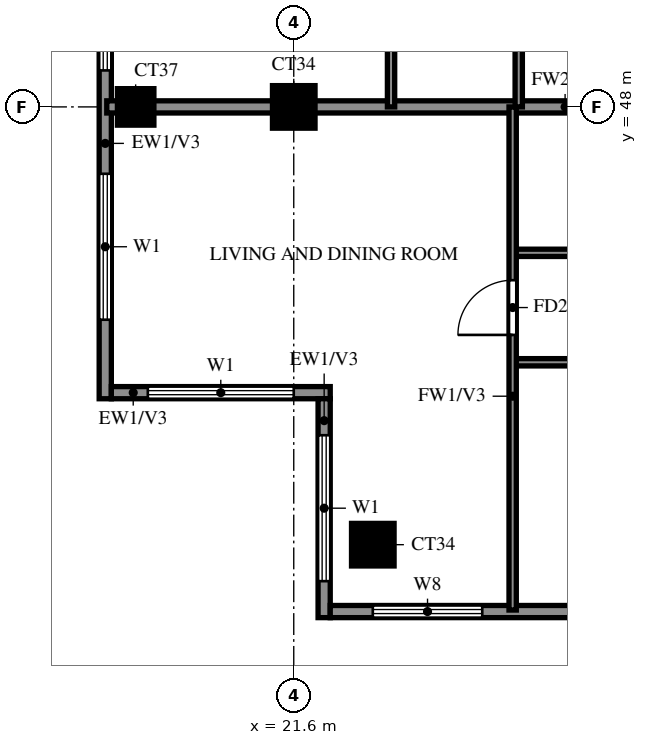
"""IFC4 building model, lengths in metres.
Left out: names, types, materials, properties, quantities, classifications, styles, units other than length and angle.
Written with IfcOpenShell. Run it as: python <this file> out.ifc"""

import sys

from ifc_helpers import new_model, si_unit, direction, frame, frame_2d, origin, origin_2d, place, context, subcontext, project, spatial, rectangle, extrude, source, transform, mapped, element, fill, save


model = new_model("IFC4")
c1 = context("Model", 3, precision=1e-05, world=origin(), true_north=direction((0.0, 1.0)))
c2 = subcontext(c1, "Body", "Model", "MODEL_VIEW")
j1 = project(units=[si_unit("LENGTHUNIT", "METRE"), si_unit("PLANEANGLEUNIT", "RADIAN")], contexts=[c1])
p1 = place(None, origin())
s1 = spatial("IfcSite", under=j1, at=p1, CompositionType="ELEMENT")
p2 = place(p1, origin())
s2 = spatial("IfcBuilding", under=s1, at=p2, CompositionType="ELEMENT")
p3 = place(p2, frame((0.0, 0.0, 260.5)))
s3 = spatial("IfcBuildingStorey", under=s2, at=p3, CompositionType="ELEMENT", Elevation=260.5)
m1 = source(origin(), c2, "Body", "SweptSolid", [
    extrude(rectangle(XDim=0.7, YDim=0.7, at=origin_2d()), origin(), (0.0, 0.0, 1.0), 3.22),
])
p4 = place(p3, frame((22.9, 40.8, 0.0), z_axis=(0.0, 0.0, 1.0), x_axis=(1.0, 0.0, 0.0)))
e1 = element("IfcColumn", 1, at=p4, inside=s3, PredefinedType="COLUMN", context=c2, shape_type="MappedRepresentation", body=[
    mapped(m1, transform((0.0, 0.0, 0.0))),
])
m2 = source(origin(), c2, "Body", "SweptSolid", [
    extrude(rectangle(XDim=0.6, YDim=0.6, at=origin_2d()), origin(), (0.0, 0.0, 1.0), 3.22),
])
p5 = place(p3, frame((19.0, 48.0, 0.0), z_axis=(0.0, 0.0, 1.0), x_axis=(1.0, 0.0, 0.0)))
e2 = element("IfcColumn", 2, at=p5, inside=s3, PredefinedType="COLUMN", context=c2, shape_type="MappedRepresentation", body=[
    mapped(m2, transform((0.0, 0.0, 0.0))),
])
p6 = place(p3, frame((21.6, 48.0, 0.0), z_axis=(0.0, 0.0, 1.0), x_axis=(1.0, 0.0, 0.0)))
e3 = element("IfcColumn", 3, at=p6, inside=s3, PredefinedType="COLUMN", context=c2, shape_type="MappedRepresentation", body=[
    mapped(m1, transform((0.0, 0.0, 0.0))),
])
p7 = place(p3, frame((18.5, 55.2, 0.0), z_axis=(0.0, 0.0, 1.0), x_axis=(0.0, -1.0, 0.0)))
e4 = element("IfcWall", 4, at=p7, inside=s3, PredefinedType="SOLIDWALL", context=c2, shape_type="SweptSolid", body=[
    extrude(rectangle(XDim=12.0, YDim=0.2, at=frame_2d((6.0, 0.0))), origin(), (0.0, 0.0, 1.0), 3.22),
])
p8 = place(p7, frame((8.3, 0.0, 0.6)))
e5 = element("IfcOpeningElement", 5, at=p8, cuts=e4, PredefinedType="OPENING", context=c2, shape_type="SweptSolid", body=[
    extrude(rectangle(XDim=2.4, YDim=2.4, at=frame_2d((1.2, 1.2))), frame((0.0, 0.11, 0.0), z_axis=(0.0, -1.0, 0.0), x_axis=(1.0, 0.0, 0.0)), (0.0, 0.0, 1.0), 0.22),
])
p9 = place(p7, frame((4.2, 0.0, 0.6)))
e6 = element("IfcOpeningElement", 6, at=p9, cuts=e4, PredefinedType="OPENING", context=c2, shape_type="SweptSolid", body=[
    extrude(rectangle(XDim=2.4, YDim=2.4, at=frame_2d((1.2, 1.2))), frame((0.0, 0.11, 0.0), z_axis=(0.0, -1.0, 0.0), x_axis=(1.0, 0.0, 0.0)), (0.0, 0.0, 1.0), 0.22),
])
p10 = place(p7, frame((0.7, 0.0, 0.6)))
e7 = element("IfcOpeningElement", 7, at=p10, cuts=e4, PredefinedType="OPENING", context=c2, shape_type="SweptSolid", body=[
    extrude(rectangle(XDim=2.4, YDim=2.4, at=frame_2d((1.2, 1.2))), frame((0.0, 0.11, 0.0), z_axis=(0.0, -1.0, 0.0), x_axis=(1.0, 0.0, 0.0)), (0.0, 0.0, 1.0), 0.22),
])
p11 = place(p3, frame((18.6, 43.3, 0.0), z_axis=(0.0, 0.0, 1.0), x_axis=(1.0, 0.0, 0.0)))
e8 = element("IfcWall", 8, at=p11, inside=s3, PredefinedType="SOLIDWALL", context=c2, shape_type="SweptSolid", body=[
    extrude(rectangle(XDim=3.6, YDim=0.2, at=frame_2d((1.8, 0.0))), origin(), (0.0, 0.0, 1.0), 3.22),
])
p12 = place(p11, frame((0.6, 0.0, 0.6)))
e9 = element("IfcOpeningElement", 9, at=p12, cuts=e8, PredefinedType="OPENING", context=c2, shape_type="SweptSolid", body=[
    extrude(rectangle(XDim=2.4, YDim=2.4, at=frame_2d((1.2, 1.2))), frame((0.0, 0.11, 0.0), z_axis=(0.0, -1.0, 0.0), x_axis=(1.0, 0.0, 0.0)), (0.0, 0.0, 1.0), 0.22),
])
p13 = place(p3, frame((22.1, 43.2, 0.0), z_axis=(0.0, 0.0, 1.0), x_axis=(0.0, -1.0, 0.0)))
e10 = element("IfcWall", 10, at=p13, inside=s3, PredefinedType="SOLIDWALL", context=c2, shape_type="SweptSolid", body=[
    extrude(rectangle(XDim=3.6, YDim=0.2, at=frame_2d((1.8, 0.0))), origin(), (0.0, 0.0, 1.0), 3.22),
])
p14 = place(p13, frame((0.6, 0.0, 0.6)))
e11 = element("IfcOpeningElement", 11, at=p14, cuts=e10, PredefinedType="OPENING", context=c2, shape_type="SweptSolid", body=[
    extrude(rectangle(XDim=2.4, YDim=2.4, at=frame_2d((1.2, 1.2))), frame((0.0, 0.11, 0.0), z_axis=(0.0, -1.0, 0.0), x_axis=(1.0, 0.0, 0.0)), (0.0, 0.0, 1.0), 0.22),
])
p15 = place(p3, frame((22.2, 39.7, 0.0), z_axis=(0.0, 0.0, 1.0), x_axis=(1.0, 0.0, 0.0)))
e12 = element("IfcWall", 12, at=p15, inside=s3, PredefinedType="SOLIDWALL", context=c2, shape_type="SweptSolid", body=[
    extrude(rectangle(XDim=19.8, YDim=0.2, at=frame_2d((9.9, 0.0))), origin(), (0.0, 0.0, 1.0), 3.22),
])
p16 = place(p15, frame((0.7, 0.0, 0.6)))
e13 = element("IfcOpeningElement", 13, at=p16, cuts=e12, PredefinedType="OPENING", context=c2, shape_type="SweptSolid", body=[
    extrude(rectangle(XDim=1.8, YDim=2.4, at=frame_2d((0.9, 1.2))), frame((0.0, 0.11, 0.0), z_axis=(0.0, -1.0, 0.0), x_axis=(1.0, 0.0, 0.0)), (0.0, 0.0, 1.0), 0.22),
])
p17 = place(p15, frame((4.35, 0.0, 1.5)))
e14 = element("IfcOpeningElement", 14, at=p17, cuts=e12, PredefinedType="OPENING", context=c2, shape_type="SweptSolid", body=[
    extrude(rectangle(XDim=0.9, YDim=0.9, at=frame_2d((0.45, 0.45))), frame((0.0, 0.11, 0.0), z_axis=(0.0, -1.0, 0.0), x_axis=(1.0, 0.0, 0.0)), (0.0, 0.0, 1.0), 0.22),
])
p18 = place(p15, frame((7.8, 0.0, 0.6)))
e15 = element("IfcOpeningElement", 15, at=p18, cuts=e12, PredefinedType="OPENING", context=c2, shape_type="SweptSolid", body=[
    extrude(rectangle(XDim=2.4, YDim=2.4, at=frame_2d((1.2, 1.2))), frame((0.0, 0.11, 0.0), z_axis=(0.0, -1.0, 0.0), x_axis=(1.0, 0.0, 0.0)), (0.0, 0.0, 1.0), 0.22),
])
p19 = place(p3, frame((18.525, 48.0, 0.0), z_axis=(0.0, 0.0, 1.0), x_axis=(1.0, 0.0, 0.0)))
e16 = element("IfcWall", 16, at=p19, inside=s3, PredefinedType="SOLIDWALL", context=c2, shape_type="SweptSolid", body=[
    extrude(rectangle(XDim=15.075, YDim=0.2, at=frame_2d((7.538, 0.0))), origin(), (0.0, 0.0, 1.0), 3.22),
])
p20 = place(p3, frame((25.2, 43.8, 0.0), z_axis=(0.0, 0.0, 1.0), x_axis=(1.0, 0.0, 0.0)))
e17 = element("IfcWall", 17, at=p20, inside=s3, PredefinedType="PARTITIONING", context=c2, shape_type="SweptSolid", body=[
    extrude(rectangle(XDim=8.4, YDim=0.12, at=frame_2d((4.2, 0.0))), origin(), (0.0, 0.0, 1.0), 3.22),
])
p21 = place(p20, frame((1.35, 0.0, 0.0)))
e18 = element("IfcOpeningElement", 18, at=p21, cuts=e17, PredefinedType="OPENING", context=c2, shape_type="SweptSolid", body=[
    extrude(rectangle(XDim=0.9, YDim=2.1, at=frame_2d((0.45, 1.05))), frame((0.0, 0.07, 0.0), z_axis=(0.0, -1.0, 0.0), x_axis=(1.0, 0.0, 0.0)), (0.0, 0.0, 1.0), 0.14),
])
p22 = place(p20, frame((5.55, 0.0, 0.0)))
e19 = element("IfcOpeningElement", 19, at=p22, cuts=e17, PredefinedType="OPENING", context=c2, shape_type="SweptSolid", body=[
    extrude(rectangle(XDim=0.9, YDim=2.1, at=frame_2d((0.45, 1.05))), frame((0.0, 0.07, 0.0), z_axis=(0.0, -1.0, 0.0), x_axis=(1.0, 0.0, 0.0)), (0.0, 0.0, 1.0), 0.14),
])
p23 = place(p3, frame((25.2, 45.6, 0.0), z_axis=(0.0, 0.0, 1.0), x_axis=(1.0, 0.0, 0.0)))
e20 = element("IfcWall", 20, at=p23, inside=s3, PredefinedType="PARTITIONING", context=c2, shape_type="SweptSolid", body=[
    extrude(rectangle(XDim=6.0, YDim=0.12, at=frame_2d((3.0, 0.0))), origin(), (0.0, 0.0, 1.0), 3.22),
])
p24 = place(p23, frame((2.55, 0.0, 0.0)))
e21 = element("IfcOpeningElement", 21, at=p24, cuts=e20, PredefinedType="OPENING", context=c2, shape_type="SweptSolid", body=[
    extrude(rectangle(XDim=0.9, YDim=2.1, at=frame_2d((0.45, 1.05))), frame((0.0, 0.07, 0.0), z_axis=(0.0, -1.0, 0.0), x_axis=(1.0, 0.0, 0.0)), (0.0, 0.0, 1.0), 0.14),
])
p25 = place(p3, frame((23.2, 48.0, 0.0), z_axis=(0.0, 0.0, 1.0), x_axis=(0.0, 1.0, 0.0)))
e22 = element("IfcWall", 22, at=p25, inside=s3, PredefinedType="PARTITIONING", context=c2, shape_type="SweptSolid", body=[
    extrude(rectangle(XDim=21.6, YDim=0.12, at=frame_2d((10.8, 0.0))), origin(), (0.0, 0.0, 1.0), 3.22),
])
p26 = place(p25, frame((1.35, 0.0, 0.0)))
e23 = element("IfcOpeningElement", 23, at=p26, cuts=e22, PredefinedType="OPENING", context=c2, shape_type="SweptSolid", body=[
    extrude(rectangle(XDim=0.9, YDim=2.1, at=frame_2d((0.45, 1.05))), frame((0.0, 0.07, 0.0), z_axis=(0.0, -1.0, 0.0), x_axis=(1.0, 0.0, 0.0)), (0.0, 0.0, 1.0), 0.14),
])
p27 = place(p25, frame((7.95, 0.0, 0.0)))
e24 = element("IfcOpeningElement", 24, at=p27, cuts=e22, PredefinedType="OPENING", context=c2, shape_type="SweptSolid", body=[
    extrude(rectangle(XDim=1.5, YDim=2.1, at=frame_2d((0.75, 1.05))), frame((0.0, 0.07, 0.0), z_axis=(0.0, -1.0, 0.0), x_axis=(1.0, 0.0, 0.0)), (0.0, 0.0, 1.0), 0.14),
])
p28 = place(p25, frame((12.15, 0.0, 0.0)))
e25 = element("IfcOpeningElement", 25, at=p28, cuts=e22, PredefinedType="OPENING", context=c2, shape_type="SweptSolid", body=[
    extrude(rectangle(XDim=0.9, YDim=2.1, at=frame_2d((0.45, 1.05))), frame((0.0, 0.07, 0.0), z_axis=(0.0, -1.0, 0.0), x_axis=(1.0, 0.0, 0.0)), (0.0, 0.0, 1.0), 0.14),
])
p29 = place(p25, frame((17.55, 0.0, 0.0)))
e26 = element("IfcOpeningElement", 26, at=p29, cuts=e22, PredefinedType="OPENING", context=c2, shape_type="SweptSolid", body=[
    extrude(rectangle(XDim=0.9, YDim=2.1, at=frame_2d((0.45, 1.05))), frame((0.0, 0.07, 0.0), z_axis=(0.0, -1.0, 0.0), x_axis=(1.0, 0.0, 0.0)), (0.0, 0.0, 1.0), 0.14),
])
p30 = place(p3, frame((25.2, 39.725, 0.0), z_axis=(0.0, 0.0, 1.0), x_axis=(0.0, 1.0, 0.0)))
e27 = element("IfcWall", 27, at=p30, inside=s3, PredefinedType="PARTITIONING", context=c2, shape_type="SweptSolid", body=[
    extrude(rectangle(XDim=8.275, YDim=0.12, at=frame_2d((4.137, 0.0))), origin(), (0.0, 0.0, 1.0), 3.22),
])
p31 = place(p30, frame((4.525, 0.0, 0.0)))
e28 = element("IfcOpeningElement", 28, at=p31, cuts=e27, PredefinedType="OPENING", context=c2, shape_type="SweptSolid", body=[
    extrude(rectangle(XDim=0.9, YDim=2.1, at=frame_2d((0.45, 1.05))), frame((0.0, 0.07, 0.0), z_axis=(0.0, -1.0, 0.0), x_axis=(1.0, 0.0, 0.0)), (0.0, 0.0, 1.0), 0.14),
])
p32 = place(p3, frame((25.3, 48.0, 0.0), z_axis=(0.0, 0.0, 1.0), x_axis=(0.0, 1.0, 0.0)))
e29 = element("IfcWall", 29, at=p32, inside=s3, PredefinedType="PARTITIONING", context=c2, shape_type="SweptSolid", body=[
    extrude(rectangle(XDim=3.6, YDim=0.12, at=frame_2d((1.8, 0.0))), origin(), (0.0, 0.0, 1.0), 3.22),
])
p33 = place(p32, frame((1.4, 0.0, 0.0)))
e30 = element("IfcOpeningElement", 30, at=p33, cuts=e29, PredefinedType="OPENING", context=c2, shape_type="SweptSolid", body=[
    extrude(rectangle(XDim=0.8, YDim=2.1, at=frame_2d((0.4, 1.05))), frame((0.0, 0.07, 0.0), z_axis=(0.0, -1.0, 0.0), x_axis=(1.0, 0.0, 0.0)), (0.0, 0.0, 1.0), 0.14),
])
p34 = place(p8, origin())
e31 = element("IfcWindow", 31, at=p34, inside=s3, PartitioningType="DOUBLE_PANEL_VERTICAL", PredefinedType="WINDOW", context=c2, shape_type="SweptSolid", body=[
    extrude(rectangle(XDim=2.4, YDim=2.4, at=frame_2d((1.2, 1.2))), frame((0.0, 0.03, 0.0), z_axis=(0.0, -1.0, 0.0), x_axis=(1.0, 0.0, 0.0)), (0.0, 0.0, 1.0), 0.06),
])
fill(e5, e31)
p35 = place(p9, origin())
e32 = element("IfcWindow", 32, at=p35, inside=s3, PartitioningType="DOUBLE_PANEL_VERTICAL", PredefinedType="WINDOW", context=c2, shape_type="SweptSolid", body=[
    extrude(rectangle(XDim=2.4, YDim=2.4, at=frame_2d((1.2, 1.2))), frame((0.0, 0.03, 0.0), z_axis=(0.0, -1.0, 0.0), x_axis=(1.0, 0.0, 0.0)), (0.0, 0.0, 1.0), 0.06),
])
fill(e6, e32)
p36 = place(p12, origin())
e33 = element("IfcWindow", 33, at=p36, inside=s3, PartitioningType="DOUBLE_PANEL_VERTICAL", PredefinedType="WINDOW", context=c2, shape_type="SweptSolid", body=[
    extrude(rectangle(XDim=2.4, YDim=2.4, at=frame_2d((1.2, 1.2))), frame((0.0, 0.03, 0.0), z_axis=(0.0, -1.0, 0.0), x_axis=(1.0, 0.0, 0.0)), (0.0, 0.0, 1.0), 0.06),
])
fill(e9, e33)
p37 = place(p14, origin())
e34 = element("IfcWindow", 34, at=p37, inside=s3, PartitioningType="DOUBLE_PANEL_VERTICAL", PredefinedType="WINDOW", context=c2, shape_type="SweptSolid", body=[
    extrude(rectangle(XDim=2.4, YDim=2.4, at=frame_2d((1.2, 1.2))), frame((0.0, 0.03, 0.0), z_axis=(0.0, -1.0, 0.0), x_axis=(1.0, 0.0, 0.0)), (0.0, 0.0, 1.0), 0.06),
])
fill(e11, e34)
p38 = place(p16, origin())
e35 = element("IfcWindow", 35, at=p38, inside=s3, PartitioningType="DOUBLE_PANEL_VERTICAL", PredefinedType="WINDOW", context=c2, shape_type="SweptSolid", body=[
    extrude(rectangle(XDim=1.8, YDim=2.4, at=frame_2d((0.9, 1.2))), frame((0.0, 0.03, 0.0), z_axis=(0.0, -1.0, 0.0), x_axis=(1.0, 0.0, 0.0)), (0.0, 0.0, 1.0), 0.06),
])
fill(e13, e35)
p39 = place(p31, origin())
e36 = element("IfcDoor", 36, at=p39, inside=s3, OperationType="SINGLE_SWING_LEFT", PredefinedType="DOOR", context=c2, shape_type="SweptSolid", body=[
    extrude(rectangle(XDim=0.9, YDim=2.1, at=frame_2d((0.45, 1.05))), frame((0.0, 0.025, 0.0), z_axis=(0.0, -1.0, 0.0), x_axis=(1.0, 0.0, 0.0)), (0.0, 0.0, 1.0), 0.05),
])
fill(e28, e36)
save(model, sys.argv[1])
